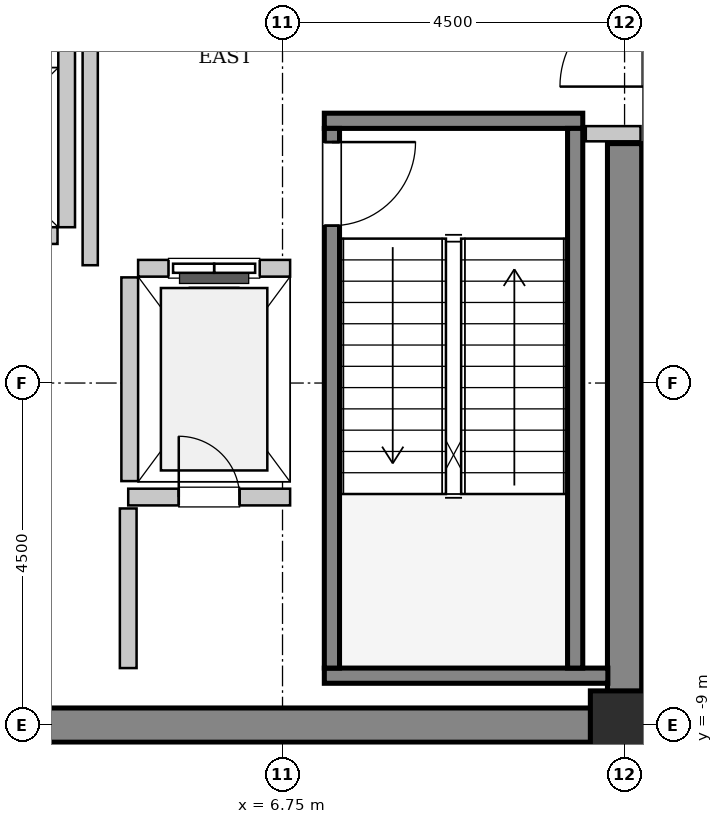
"""IFC4 building model, lengths in metres.
Left out: names, types, materials, properties, quantities, classifications, styles, units other than length and angle.
Written with IfcOpenShell. Run it as: python <this file> out.ifc"""

import sys

from ifc_helpers import new_model, si_unit, direction, frame, frame_2d, origin, origin_2d, place, context, subcontext, project, spatial, rectangle, extrude, source, transform, mapped, element, fill, save


model = new_model("IFC4")
c1 = context("Model", 3, precision=1e-05, world=origin(), true_north=direction((0.0, 1.0)))
c2 = subcontext(c1, "Body", "Model", "MODEL_VIEW")
j1 = project(units=[si_unit("LENGTHUNIT", "METRE"), si_unit("PLANEANGLEUNIT", "RADIAN")], contexts=[c1])
p1 = place(None, origin())
s1 = spatial("IfcSite", under=j1, at=p1, CompositionType="ELEMENT")
p2 = place(p1, origin())
s2 = spatial("IfcBuilding", under=s1, at=p2, CompositionType="ELEMENT")
p3 = place(p2, frame((0.0, 0.0, 317.8)))
s3 = spatial("IfcBuildingStorey", under=s2, at=p3, CompositionType="ELEMENT", Elevation=317.8)
m1 = source(origin(), c2, "Body", "SweptSolid", [
    extrude(rectangle(XDim=9.925, YDim=0.45, at=frame_2d((4.962, 0.0))), origin(), (0.0, 0.0, 1.0), 4.6),
])
p4 = place(p3, frame((1.55, -9.0, 0.0), z_axis=(0.0, 0.0, 1.0), x_axis=(1.0, 0.0, 0.0)))
e1 = element("IfcWall", 1, at=p4, inside=s3, PredefinedType="SHEAR", context=c2, shape_type="MappedRepresentation", body=[
    mapped(m1, transform((0.0, 0.0, 0.0), x_axis=(1.0, 0.0, 0.0), y_axis=(0.0, 1.0, 0.0), z_axis=(0.0, 0.0, 1.0), scale=1.0)),
])
m2 = source(origin(), c2, "Body", "SweptSolid", [
    extrude(rectangle(XDim=7.425, YDim=0.45, at=frame_2d((3.712, 0.0))), origin(), (0.0, 0.0, 1.0), 4.6),
])
p5 = place(p3, frame((11.25, -8.775, 0.0), z_axis=(0.0, 0.0, 1.0), x_axis=(0.0, 1.0, 0.0)))
e2 = element("IfcWall", 2, at=p5, inside=s3, PredefinedType="SHEAR", context=c2, shape_type="MappedRepresentation", body=[
    mapped(m2, transform((0.0, 0.0, 0.0), x_axis=(1.0, 0.0, 0.0), y_axis=(0.0, 1.0, 0.0), z_axis=(0.0, 0.0, 1.0), scale=1.0)),
])
m3 = source(origin(), c2, "Body", "SweptSolid", [
    extrude(rectangle(XDim=0.9, YDim=0.9, at=origin_2d()), origin(), (0.0, 0.0, 1.0), 4.6),
])
p6 = place(p3, frame((11.25, -9.0, 0.0), z_axis=(0.0, 0.0, 1.0), x_axis=(1.0, 0.0, 0.0)))
e3 = element("IfcColumn", 3, at=p6, inside=s3, PredefinedType="COLUMN", context=c2, shape_type="MappedRepresentation", body=[
    mapped(m3, transform((0.0, 0.0, 0.0), x_axis=(1.0, 0.0, 0.0), y_axis=(0.0, 1.0, 0.0), z_axis=(0.0, 0.0, 1.0), scale=1.0)),
])
m4 = source(origin(), c2, "Body", "SweptSolid", [
    extrude(rectangle(XDim=3.4, YDim=0.2, at=frame_2d((1.7, 0.0))), origin(), (0.0, 0.0, 1.0), 4.6),
])
p7 = place(p3, frame((7.3, -1.05, 0.0), z_axis=(0.0, 0.0, 1.0), x_axis=(1.0, 0.0, 0.0)))
e4 = element("IfcWall", 4, at=p7, inside=s3, PredefinedType="SOLIDWALL", context=c2, shape_type="MappedRepresentation", body=[
    mapped(m4, transform((0.0, 0.0, 0.0), x_axis=(1.0, 0.0, 0.0), y_axis=(0.0, 1.0, 0.0), z_axis=(0.0, 0.0, 1.0), scale=1.0)),
])
m5 = source(origin(), c2, "Body", "SweptSolid", [
    extrude(rectangle(XDim=3.73, YDim=0.2, at=frame_2d((1.865, 0.0))), origin(), (0.0, 0.0, 1.0), 4.6),
])
p8 = place(p3, frame((7.3, -8.35, 0.0), z_axis=(0.0, 0.0, 1.0), x_axis=(1.0, 0.0, 0.0)))
e5 = element("IfcWall", 5, at=p8, inside=s3, PredefinedType="SOLIDWALL", context=c2, shape_type="MappedRepresentation", body=[
    mapped(m5, transform((0.0, 0.0, 0.0), x_axis=(1.0, 0.0, 0.0), y_axis=(0.0, 1.0, 0.0), z_axis=(0.0, 0.0, 1.0), scale=1.0)),
])
m6 = source(origin(), c2, "Body", "SweptSolid", [
    extrude(rectangle(XDim=7.1, YDim=0.2, at=frame_2d((3.55, 0.0))), origin(), (0.0, 0.0, 1.0), 4.6),
])
p9 = place(p3, frame((7.4, -1.15, 0.0), z_axis=(0.0, 0.0, 1.0), x_axis=(0.0, -1.0, 0.0)))
e6 = element("IfcWall", 6, at=p9, inside=s3, PredefinedType="SOLIDWALL", context=c2, shape_type="MappedRepresentation", body=[
    mapped(m6, transform((0.0, 0.0, 0.0), x_axis=(1.0, 0.0, 0.0), y_axis=(0.0, 1.0, 0.0), z_axis=(0.0, 0.0, 1.0), scale=1.0)),
])
p10 = place(p9, frame((0.18, 0.0, 0.0)))
e7 = element("IfcOpeningElement", 7, at=p10, cuts=e6, PredefinedType="OPENING", context=c2, shape_type="SweptSolid", body=[
    extrude(rectangle(XDim=1.1, YDim=2.15, at=frame_2d((0.55, 1.075))), frame((0.0, 0.11, 0.0), z_axis=(0.0, -1.0, 0.0), x_axis=(1.0, 0.0, 0.0)), (0.0, 0.0, 1.0), 0.22),
])
p11 = place(p3, frame((10.6, -1.15, 0.0), z_axis=(0.0, 0.0, 1.0), x_axis=(0.0, -1.0, 0.0)))
e8 = element("IfcWall", 8, at=p11, inside=s3, PredefinedType="SOLIDWALL", context=c2, shape_type="MappedRepresentation", body=[
    mapped(m6, transform((0.0, 0.0, 0.0), x_axis=(1.0, 0.0, 0.0), y_axis=(0.0, 1.0, 0.0), z_axis=(0.0, 0.0, 1.0), scale=1.0)),
])
m7 = source(origin(), c2, "Body", "SweptSolid", [
    extrude(rectangle(XDim=2.0, YDim=0.22, at=frame_2d((1.0, 0.0))), origin(), (0.0, 0.0, 1.0), 4.335),
])
p12 = place(p3, frame((6.85, -2.99, 0.0), z_axis=(0.0, 0.0, 1.0), x_axis=(-1.0, 0.0, 0.0)))
e9 = element("IfcWall", 9, at=p12, inside=s3, PredefinedType="SOLIDWALL", context=c2, shape_type="MappedRepresentation", body=[
    mapped(m7, transform((0.0, 0.0, 0.0), x_axis=(1.0, 0.0, 0.0), y_axis=(0.0, 1.0, 0.0), z_axis=(0.0, 0.0, 1.0), scale=1.0)),
])
p13 = place(p12, frame((0.4, 0.0, 0.0)))
e10 = element("IfcOpeningElement", 10, at=p13, cuts=e9, PredefinedType="OPENING", context=c2, shape_type="SweptSolid", body=[
    extrude(rectangle(XDim=1.2, YDim=2.2, at=frame_2d((0.6, 1.1))), frame((0.0, 0.12, 0.0), z_axis=(0.0, -1.0, 0.0), x_axis=(1.0, 0.0, 0.0)), (0.0, 0.0, 1.0), 0.24),
])
m8 = source(origin(), c2, "Body", "SweptSolid", [
    extrude(rectangle(XDim=2.68, YDim=0.22, at=frame_2d((1.34, 0.0))), origin(), (0.0, 0.0, 1.0), 4.335),
])
p14 = place(p3, frame((4.74, -3.11, 0.0), z_axis=(0.0, 0.0, 1.0), x_axis=(0.0, -1.0, 0.0)))
e11 = element("IfcWall", 11, at=p14, inside=s3, PredefinedType="SOLIDWALL", context=c2, shape_type="MappedRepresentation", body=[
    mapped(m8, transform((0.0, 0.0, 0.0), x_axis=(1.0, 0.0, 0.0), y_axis=(0.0, 1.0, 0.0), z_axis=(0.0, 0.0, 1.0), scale=1.0)),
])
m9 = source(origin(), c2, "Body", "SweptSolid", [
    extrude(rectangle(XDim=4.9, YDim=0.22, at=frame_2d((2.45, 0.0))), origin(), (0.0, 0.0, 1.0), 4.335),
])
p15 = place(p3, frame((3.91, -2.45, 0.0), z_axis=(0.0, 0.0, 1.0), x_axis=(0.0, 1.0, 0.0)))
e12 = element("IfcWall", 12, at=p15, inside=s3, PredefinedType="SOLIDWALL", context=c2, shape_type="MappedRepresentation", body=[
    mapped(m9, transform((0.0, 0.0, 0.0), x_axis=(1.0, 0.0, 0.0), y_axis=(0.0, 1.0, 0.0), z_axis=(0.0, 0.0, 1.0), scale=1.0)),
])
m10 = source(origin(), c2, "Body", "SweptSolid", [
    extrude(rectangle(XDim=2.13, YDim=0.22, at=frame_2d((1.065, 0.0))), origin(), (0.0, 0.0, 1.0), 4.335),
])
p16 = place(p3, frame((1.66, -2.56, 0.0), z_axis=(0.0, 0.0, 1.0), x_axis=(1.0, 0.0, 0.0)))
e13 = element("IfcWall", 13, at=p16, inside=s3, PredefinedType="SOLIDWALL", context=c2, shape_type="MappedRepresentation", body=[
    mapped(m10, transform((0.0, 0.0, 0.0), x_axis=(1.0, 0.0, 0.0), y_axis=(0.0, 1.0, 0.0), z_axis=(0.0, 0.0, 1.0), scale=1.0)),
])
p17 = place(p3, frame((4.72, -6.0, 0.0), z_axis=(0.0, 0.0, 1.0), x_axis=(1.0, 0.0, 0.0)))
e14 = element("IfcWall", 14, at=p17, inside=s3, PredefinedType="SOLIDWALL", context=c2, shape_type="MappedRepresentation", body=[
    mapped(m10, transform((0.0, 0.0, 0.0), x_axis=(1.0, 0.0, 0.0), y_axis=(0.0, 1.0, 0.0), z_axis=(0.0, 0.0, 1.0), scale=1.0)),
])
p18 = place(p17, frame((0.665, 0.0, 0.0)))
e15 = element("IfcOpeningElement", 15, at=p18, cuts=e14, PredefinedType="OPENING", context=c2, shape_type="SweptSolid", body=[
    extrude(rectangle(XDim=0.8, YDim=2.0, at=frame_2d((0.4, 1.0))), frame((0.0, 0.12, 0.0), z_axis=(0.0, -1.0, 0.0), x_axis=(1.0, 0.0, 0.0)), (0.0, 0.0, 1.0), 0.24),
])
m11 = source(origin(), c2, "Body", "SweptSolid", [
    extrude(rectangle(XDim=2.1, YDim=0.22, at=frame_2d((1.05, 0.0))), origin(), (0.0, 0.0, 1.0), 4.335),
])
p19 = place(p3, frame((4.72, -8.25, 0.0), z_axis=(0.0, 0.0, 1.0), x_axis=(0.0, 1.0, 0.0)))
e16 = element("IfcWall", 16, at=p19, inside=s3, PredefinedType="SOLIDWALL", context=c2, shape_type="MappedRepresentation", body=[
    mapped(m11, transform((0.0, 0.0, 0.0), x_axis=(1.0, 0.0, 0.0), y_axis=(0.0, 1.0, 0.0), z_axis=(0.0, 0.0, 1.0), scale=1.0)),
])
m12 = source(origin(), c2, "Body", "SweptSolid", [
    extrude(rectangle(XDim=5.9, YDim=0.2, at=frame_2d((2.95, 0.0))), origin(), (0.0, 0.0, 1.0), 4.335),
])
p20 = place(p3, frame((4.22, -2.95, 0.0), z_axis=(0.0, 0.0, 1.0), x_axis=(0.0, 1.0, 0.0)))
e17 = element("IfcWall", 17, at=p20, inside=s3, PredefinedType="PARTITIONING", context=c2, shape_type="MappedRepresentation", body=[
    mapped(m12, transform((0.0, 0.0, 0.0), x_axis=(1.0, 0.0, 0.0), y_axis=(0.0, 1.0, 0.0), z_axis=(0.0, 0.0, 1.0), scale=1.0)),
])
m13 = source(origin(), c2, "Body", "SweptSolid", [
    extrude(rectangle(XDim=0.72, YDim=0.2, at=frame_2d((0.36, 0.0))), origin(), (0.0, 0.0, 1.0), 4.335),
])
p21 = place(p3, frame((10.74, -1.22, 0.0), z_axis=(0.0, 0.0, 1.0), x_axis=(1.0, 0.0, 0.0)))
e18 = element("IfcWall", 18, at=p21, inside=s3, PredefinedType="PARTITIONING", context=c2, shape_type="MappedRepresentation", body=[
    mapped(m13, transform((0.0, 0.0, 0.0), x_axis=(1.0, 0.0, 0.0), y_axis=(0.0, 1.0, 0.0), z_axis=(0.0, 0.0, 1.0), scale=1.0)),
])
m14 = source(origin(), c2, "Body", "SweptSolid", [
    extrude(rectangle(XDim=1.1, YDim=2.15, at=frame_2d((0.55, 1.075))), frame((0.0, 0.025, 0.0), z_axis=(0.0, -1.0, 0.0), x_axis=(1.0, 0.0, 0.0)), (0.0, 0.0, 1.0), 0.05),
])
p22 = place(p10, origin())
e19 = element("IfcDoor", 19, at=p22, inside=s3, OperationType="SINGLE_SWING_LEFT", PredefinedType="DOOR", context=c2, shape_type="MappedRepresentation", body=[
    mapped(m14, transform((0.0, 0.0, 0.0), x_axis=(1.0, 0.0, 0.0), y_axis=(0.0, 1.0, 0.0), z_axis=(0.0, 0.0, 1.0), scale=1.0)),
])
fill(e7, e19)
m15 = source(origin(), c2, "Body", "SweptSolid", [
    extrude(rectangle(XDim=1.2, YDim=2.2, at=frame_2d((0.6, 1.1))), frame((0.0, 0.025, 0.0), z_axis=(0.0, -1.0, 0.0), x_axis=(1.0, 0.0, 0.0)), (0.0, 0.0, 1.0), 0.05),
])
p23 = place(p13, origin())
e20 = element("IfcDoor", 20, at=p23, inside=s3, OperationType="SLIDING_TO_LEFT", PredefinedType="DOOR", context=c2, shape_type="MappedRepresentation", body=[
    mapped(m15, transform((0.0, 0.0, 0.0), x_axis=(1.0, 0.0, 0.0), y_axis=(0.0, 1.0, 0.0), z_axis=(0.0, 0.0, 1.0), scale=1.0)),
])
fill(e10, e20)
m16 = source(origin(), c2, "Body", "SweptSolid", [
    extrude(rectangle(XDim=0.8, YDim=2.0, at=frame_2d((0.4, 1.0))), frame((0.0, 0.025, 0.0), z_axis=(0.0, -1.0, 0.0), x_axis=(1.0, 0.0, 0.0)), (0.0, 0.0, 1.0), 0.05),
])
p24 = place(p18, origin())
e21 = element("IfcDoor", 21, at=p24, inside=s3, OperationType="SINGLE_SWING_LEFT", PredefinedType="TRAPDOOR", context=c2, shape_type="MappedRepresentation", body=[
    mapped(m16, transform((0.0, 0.0, 0.0), x_axis=(1.0, 0.0, 0.0), y_axis=(0.0, 1.0, 0.0), z_axis=(0.0, 0.0, 1.0), scale=1.0)),
])
fill(e15, e21)
save(model, sys.argv[1])
